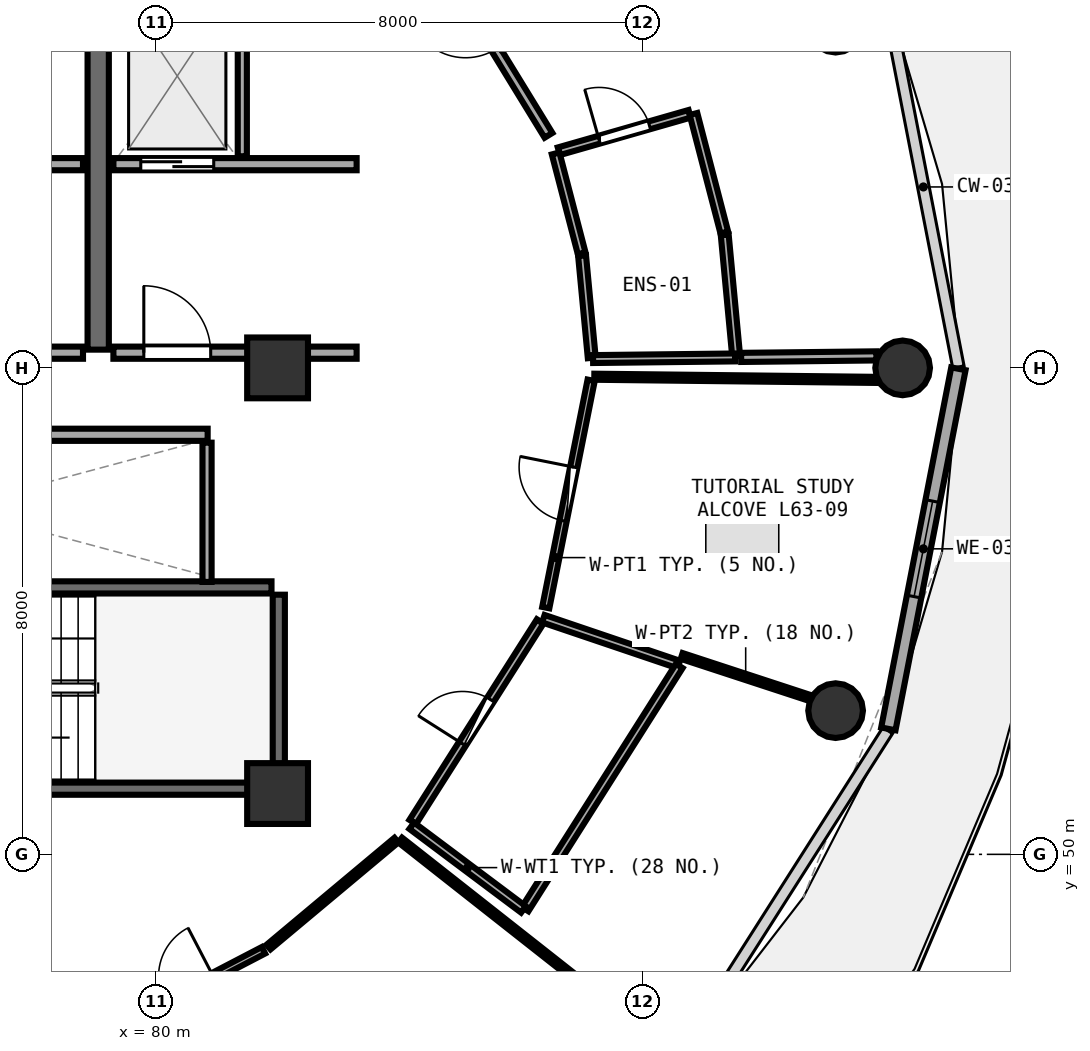
"""IFC4 building model, lengths in metres.
Left out: names, types, materials, properties, quantities, classifications, styles, units other than length and angle.
Written with IfcOpenShell. Run it as: python <this file> out.ifc"""

import sys

from ifc_helpers import new_model, si_unit, direction, frame, frame_2d, origin, origin_2d, place, context, subcontext, project, spatial, rectangle, circle, extrude, element, fill, save


model = new_model("IFC4")
c1 = context("Model", 3, precision=1e-05, world=origin(), true_north=direction((0.0, 1.0)))
c2 = subcontext(c1, "Body", "Model", "MODEL_VIEW")
j1 = project(units=[si_unit("LENGTHUNIT", "METRE"), si_unit("PLANEANGLEUNIT", "RADIAN")], contexts=[c1])
p1 = place(None, origin())
s1 = spatial("IfcSite", under=j1, at=p1, CompositionType="ELEMENT")
p2 = place(p1, origin())
s2 = spatial("IfcBuilding", under=s1, at=p2, CompositionType="ELEMENT")
p3 = place(p2, frame((0.0, 0.0, 248.7)))
s3 = spatial("IfcBuildingStorey", under=s2, at=p3, CompositionType="ELEMENT", Elevation=248.7)
for number, where, z_axis, x_axis in (
    (1, (82.0, 51.0, 0.0), (0.0, 0.0, 1.0), (1.0, 0.0, 0.0)),
    (2, (82.0, 58.0, 0.0), (0.0, 0.0, 1.0), (1.0, 0.0, 0.0)),
):
    element("IfcColumn", number, at=place(p3, frame(where, z_axis=z_axis, x_axis=x_axis)), inside=s3, PredefinedType="PILASTER", context=c2, shape_type="SweptSolid", body=[
        extrude(rectangle(XDim=1.0, YDim=1.0, at=origin_2d()), origin(), (0.0, 0.0, 1.0), 3.75),
    ])
for number, where, z_axis, x_axis in (
    (3, (92.28, 58.0, 0.0), (0.0, 0.0, 1.0), (1.0, 0.0, 0.0)),
    (4, (91.177, 63.636, 0.0), (0.0, 0.0, 1.0), (1.0, 0.0, 0.0)),
    (5, (91.177, 52.364, 0.0), (0.0, 0.0, 1.0), (1.0, 0.0, 0.0)),
):
    element("IfcColumn", number, at=place(p3, frame(where, z_axis=z_axis, x_axis=x_axis)), inside=s3, PredefinedType="COLUMN", context=c2, shape_type="SweptSolid", body=[
        extrude(circle(Radius=0.45, at=origin_2d()), origin(), (0.0, 0.0, 1.0), 3.75),
    ])
p4 = place(p3, frame((92.045, 52.063, 0.0), z_axis=(0.0, 0.0, 1.0), x_axis=(0.190969309115, 0.981596008028, 0.0)))
e6 = element("IfcWall", 6, at=p4, inside=s3, PredefinedType="SOLIDWALL", context=c2, shape_type="SweptSolid", body=[
    extrude(rectangle(XDim=6.033, YDim=0.24, at=frame_2d((3.017, 0.0))), origin(), (0.0, 0.0, 1.0), 3.475),
])
p5 = place(p4, frame((2.216, 0.0, 0.85)))
e7 = element("IfcOpeningElement", 7, at=p5, cuts=e6, PredefinedType="OPENING", context=c2, shape_type="SweptSolid", body=[
    extrude(rectangle(XDim=1.6, YDim=1.45, at=frame_2d((0.8, 0.725))), frame((0.0, 0.13, 0.0), z_axis=(0.0, -1.0, 0.0), x_axis=(1.0, 0.0, 0.0)), (0.0, 0.0, 1.0), 0.26),
])
p6 = place(p3, frame((74.0, 51.08, 0.0), z_axis=(0.0, 0.0, 1.0), x_axis=(1.0, 0.0, 0.0)))
e8 = element("IfcWall", 8, at=p6, inside=s3, PredefinedType="SHEAR", context=c2, shape_type="SweptSolid", body=[
    extrude(rectangle(XDim=7.9, YDim=0.2, at=frame_2d((3.95, 0.0))), origin(), (0.0, 0.0, 1.0), 3.49),
])
p7 = place(p6, frame((1.12, 0.0, 0.0)))
e9 = element("IfcOpeningElement", 9, at=p7, cuts=e8, PredefinedType="OPENING", context=c2, shape_type="SweptSolid", body=[
    extrude(rectangle(XDim=1.05, YDim=2.1, at=frame_2d((0.525, 1.05))), frame((0.0, 0.11, 0.0), z_axis=(0.0, -1.0, 0.0), x_axis=(1.0, 0.0, 0.0)), (0.0, 0.0, 1.0), 0.22),
])
p8 = place(p3, frame((82.02, 51.2, 0.0), z_axis=(0.0, 0.0, 1.0), x_axis=(0.0, 1.0, 0.0)))
e10 = element("IfcWall", 10, at=p8, inside=s3, PredefinedType="SHEAR", context=c2, shape_type="SweptSolid", body=[
    extrude(rectangle(XDim=3.07, YDim=0.2, at=frame_2d((1.535, 0.0))), origin(), (0.0, 0.0, 1.0), 3.49),
])
p9 = place(p3, frame((81.9, 54.39, 0.0), z_axis=(0.0, 0.0, 1.0), x_axis=(-1.0, 0.0, 0.0)))
e11 = element("IfcWall", 11, at=p9, inside=s3, PredefinedType="SHEAR", context=c2, shape_type="SweptSolid", body=[
    extrude(rectangle(XDim=8.46, YDim=0.2, at=frame_2d((4.23, 0.0))), origin(), (0.0, 0.0, 1.0), 3.49),
])
p10 = place(p3, frame((79.05, 58.3, 0.0), z_axis=(0.0, 0.0, 1.0), x_axis=(0.0, 1.0, 0.0)))
e12 = element("IfcWall", 12, at=p10, inside=s3, PredefinedType="SHEAR", context=c2, shape_type="SweptSolid", body=[
    extrude(rectangle(XDim=6.3, YDim=0.35, at=frame_2d((3.15, 0.0))), origin(), (0.0, 0.0, 1.0), 3.49),
])
p11 = place(p3, frame((74.2, 61.35, 0.0), z_axis=(0.0, 0.0, 1.0), x_axis=(1.0, 0.0, 0.0)))
e13 = element("IfcWall", 13, at=p11, inside=s3, PredefinedType="SOLIDWALL", context=c2, shape_type="SweptSolid", body=[
    extrude(rectangle(XDim=4.6, YDim=0.2, at=frame_2d((2.3, 0.0))), origin(), (0.0, 0.0, 1.0), 3.48),
])
p12 = place(p11, frame((0.52, 0.0, 0.0)))
e14 = element("IfcOpeningElement", 14, at=p12, cuts=e13, PredefinedType="OPENING", context=c2, shape_type="SweptSolid", body=[
    extrude(rectangle(XDim=1.2, YDim=2.15, at=frame_2d((0.6, 1.075))), frame((0.0, 0.11, 0.0), z_axis=(0.0, -1.0, 0.0), x_axis=(1.0, 0.0, 0.0)), (0.0, 0.0, 1.0), 0.22),
])
p13 = place(p3, frame((79.3, 61.35, 0.0), z_axis=(0.0, 0.0, 1.0), x_axis=(1.0, 0.0, 0.0)))
e15 = element("IfcWall", 15, at=p13, inside=s3, PredefinedType="SOLIDWALL", context=c2, shape_type="SweptSolid", body=[
    extrude(rectangle(XDim=4.0, YDim=0.2, at=frame_2d((2.0, 0.0))), origin(), (0.0, 0.0, 1.0), 2.775),
])
p14 = place(p13, frame((0.45, 0.0, 0.0)))
e16 = element("IfcOpeningElement", 16, at=p14, cuts=e15, PredefinedType="OPENING", context=c2, shape_type="SweptSolid", body=[
    extrude(rectangle(XDim=1.2, YDim=2.15, at=frame_2d((0.6, 1.075))), frame((0.0, 0.11, 0.0), z_axis=(0.0, -1.0, 0.0), x_axis=(1.0, 0.0, 0.0)), (0.0, 0.0, 1.0), 0.22),
])
p15 = place(p3, frame((81.42, 61.48, 0.0), z_axis=(0.0, 0.0, 1.0), x_axis=(0.0, 1.0, 0.0)))
e17 = element("IfcWall", 17, at=p15, inside=s3, PredefinedType="PARTITIONING", context=c2, shape_type="SweptSolid", body=[
    extrude(rectangle(XDim=2.84, YDim=0.15, at=frame_2d((1.42, 0.0))), origin(), (0.0, 0.0, 1.0), 3.48),
])
p16 = place(p3, frame((74.2, 58.25, 0.0), z_axis=(0.0, 0.0, 1.0), x_axis=(1.0, 0.0, 0.0)))
e18 = element("IfcWall", 18, at=p16, inside=s3, PredefinedType="SOLIDWALL", context=c2, shape_type="SweptSolid", body=[
    extrude(rectangle(XDim=4.6, YDim=0.2, at=frame_2d((2.3, 0.0))), origin(), (0.0, 0.0, 1.0), 3.48),
])
p17 = place(p16, frame((1.8, 0.0, 0.0)))
e19 = element("IfcOpeningElement", 19, at=p17, cuts=e18, PredefinedType="OPENING", context=c2, shape_type="SweptSolid", body=[
    extrude(rectangle(XDim=1.1, YDim=2.1, at=frame_2d((0.55, 1.05))), frame((0.0, 0.11, 0.0), z_axis=(0.0, -1.0, 0.0), x_axis=(1.0, 0.0, 0.0)), (0.0, 0.0, 1.0), 0.22),
])
p18 = place(p3, frame((79.3, 58.25, 0.0), z_axis=(0.0, 0.0, 1.0), x_axis=(1.0, 0.0, 0.0)))
e20 = element("IfcWall", 20, at=p18, inside=s3, PredefinedType="SOLIDWALL", context=c2, shape_type="SweptSolid", body=[
    extrude(rectangle(XDim=4.0, YDim=0.2, at=frame_2d((2.0, 0.0))), origin(), (0.0, 0.0, 1.0), 2.775),
])
p19 = place(p18, frame((0.5, 0.0, 0.0)))
e21 = element("IfcOpeningElement", 21, at=p19, cuts=e20, PredefinedType="OPENING", context=c2, shape_type="SweptSolid", body=[
    extrude(rectangle(XDim=1.1, YDim=2.1, at=frame_2d((0.55, 1.05))), frame((0.0, 0.11, 0.0), z_axis=(0.0, -1.0, 0.0), x_axis=(1.0, 0.0, 0.0)), (0.0, 0.0, 1.0), 0.22),
])
p20 = place(p3, frame((72.45, 56.9, 0.0), z_axis=(0.0, 0.0, 1.0), x_axis=(1.0, 0.0, 0.0)))
e22 = element("IfcWall", 22, at=p20, inside=s3, PredefinedType="SOLIDWALL", context=c2, shape_type="SweptSolid", body=[
    extrude(rectangle(XDim=8.4, YDim=0.2, at=frame_2d((4.2, 0.0))), origin(), (0.0, 0.0, 1.0), 3.48),
])
p21 = place(p20, frame((0.4, 0.0, 0.0)))
e23 = element("IfcOpeningElement", 23, at=p21, cuts=e22, PredefinedType="OPENING", context=c2, shape_type="SweptSolid", body=[
    extrude(rectangle(XDim=1.1, YDim=2.1, at=frame_2d((0.55, 1.05))), frame((0.0, 0.11, 0.0), z_axis=(0.0, -1.0, 0.0), x_axis=(1.0, 0.0, 0.0)), (0.0, 0.0, 1.0), 0.22),
])
p22 = place(p20, frame((2.4, 0.0, 0.0)))
e24 = element("IfcOpeningElement", 24, at=p22, cuts=e22, PredefinedType="OPENING", context=c2, shape_type="SweptSolid", body=[
    extrude(rectangle(XDim=1.1, YDim=2.1, at=frame_2d((0.55, 1.05))), frame((0.0, 0.11, 0.0), z_axis=(0.0, -1.0, 0.0), x_axis=(1.0, 0.0, 0.0)), (0.0, 0.0, 1.0), 0.22),
])
p23 = place(p3, frame((80.84, 54.48, 0.0), z_axis=(0.0, 0.0, 1.0), x_axis=(0.0, 1.0, 0.0)))
e25 = element("IfcWall", 25, at=p23, inside=s3, PredefinedType="PARTITIONING", context=c2, shape_type="SweptSolid", body=[
    extrude(rectangle(XDim=2.29, YDim=0.15, at=frame_2d((1.145, 0.0))), origin(), (0.0, 0.0, 1.0), 3.48),
])
p24 = place(p3, frame((86.626, 61.562, 0.0), z_axis=(0.0, 0.0, 1.0), x_axis=(0.961379738838, 0.275225358117, 0.0)))
e26 = element("IfcWall", 26, at=p24, inside=s3, PredefinedType="PLUMBINGWALL", context=c2, shape_type="SweptSolid", body=[
    extrude(rectangle(XDim=2.238, YDim=0.13, at=frame_2d((1.119, 0.0))), origin(), (0.0, 0.0, 1.0), 3.175),
])
p25 = place(p24, frame((0.689, 0.0, 0.0)))
e27 = element("IfcOpeningElement", 27, at=p25, cuts=e26, PredefinedType="OPENING", context=c2, shape_type="SweptSolid", body=[
    extrude(rectangle(XDim=0.86, YDim=2.05, at=frame_2d((0.43, 1.025))), frame((0.0, 0.075, 0.0), z_axis=(0.0, -1.0, 0.0), x_axis=(1.0, 0.0, 0.0)), (0.0, 0.0, 1.0), 0.15),
])
p26 = place(p3, frame((86.456, 61.824, 0.0), z_axis=(0.0, 0.0, 1.0), x_axis=(-0.522665227064, 0.852538011128, 0.0)))
e28 = element("IfcWall", 28, at=p26, inside=s3, PredefinedType="PARTITIONING", context=c2, shape_type="SweptSolid", body=[
    extrude(rectangle(XDim=4.273, YDim=0.15, at=frame_2d((2.136, 0.0))), origin(), (0.0, 0.0, 1.0), 3.075),
])
p27 = place(p26, frame((1.661, 0.0, 0.0)))
e29 = element("IfcOpeningElement", 29, at=p27, cuts=e28, PredefinedType="OPENING", context=c2, shape_type="SweptSolid", body=[
    extrude(rectangle(XDim=0.95, YDim=2.08, at=frame_2d((0.475, 1.04))), frame((0.0, 0.085, 0.0), z_axis=(0.0, -1.0, 0.0), x_axis=(1.0, 0.0, 0.0)), (0.0, 0.0, 1.0), 0.17),
])
p28 = place(p3, frame((79.319, 47.148, 0.0), z_axis=(0.0, 0.0, 1.0), x_axis=(0.887021247279, 0.461728607382, 0.0)))
e30 = element("IfcWall", 30, at=p28, inside=s3, PredefinedType="PARTITIONING", context=c2, shape_type="SweptSolid", body=[
    extrude(rectangle(XDim=2.761, YDim=0.12, at=frame_2d((1.38, 0.0))), origin(), (0.0, 0.0, 1.0), 3.235),
])
p29 = place(p28, frame((0.93, 0.0, 0.0)))
e31 = element("IfcOpeningElement", 31, at=p29, cuts=e30, PredefinedType="OPENING", context=c2, shape_type="SweptSolid", body=[
    extrude(rectangle(XDim=0.9, YDim=2.08, at=frame_2d((0.45, 1.04))), frame((0.0, 0.07, 0.0), z_axis=(0.0, -1.0, 0.0), x_axis=(1.0, 0.0, 0.0)), (0.0, 0.0, 1.0), 0.14),
])
p30 = place(p3, frame((84.223, 50.533, 0.0), z_axis=(0.0, 0.0, 1.0), x_axis=(0.536434868975, 0.84394172272, 0.0)))
e32 = element("IfcWall", 32, at=p30, inside=s3, PredefinedType="PLUMBINGWALL", context=c2, shape_type="SweptSolid", body=[
    extrude(rectangle(XDim=3.908, YDim=0.13, at=frame_2d((1.954, 0.0))), origin(), (0.0, 0.0, 1.0), 3.075),
])
p31 = place(p30, frame((1.524, 0.0, 0.0)))
e33 = element("IfcOpeningElement", 33, at=p31, cuts=e32, PredefinedType="OPENING", context=c2, shape_type="SweptSolid", body=[
    extrude(rectangle(XDim=0.86, YDim=2.05, at=frame_2d((0.43, 1.025))), frame((0.0, 0.075, 0.0), z_axis=(0.0, -1.0, 0.0), x_axis=(1.0, 0.0, 0.0)), (0.0, 0.0, 1.0), 0.15),
])
p32 = place(p3, frame((86.411, 54.058, 0.0), z_axis=(0.0, 0.0, 1.0), x_axis=(0.195845174173, 0.980634828952, 0.0)))
e34 = element("IfcWall", 34, at=p32, inside=s3, PredefinedType="PARTITIONING", context=c2, shape_type="SweptSolid", body=[
    extrude(rectangle(XDim=3.812, YDim=0.12, at=frame_2d((1.906, 0.0))), origin(), (0.0, 0.0, 1.0), 3.48),
])
p33 = place(p32, frame((1.456, 0.0, 0.0)))
e35 = element("IfcOpeningElement", 35, at=p33, cuts=e34, PredefinedType="OPENING", context=c2, shape_type="SweptSolid", body=[
    extrude(rectangle(XDim=0.9, YDim=2.08, at=frame_2d((0.45, 1.04))), frame((0.0, 0.07, 0.0), z_axis=(0.0, -1.0, 0.0), x_axis=(1.0, 0.0, 0.0)), (0.0, 0.0, 1.0), 0.14),
])
p34 = place(p3, frame((87.167, 58.165, 0.0), z_axis=(0.0, 0.0, 1.0), x_axis=(-0.094303984979, 0.995543448784, 0.0)))
e36 = element("IfcWall", 36, at=p34, inside=s3, PredefinedType="PLUMBINGWALL", context=c2, shape_type="SweptSolid", body=[
    extrude(rectangle(XDim=1.688, YDim=0.13, at=frame_2d((0.844, 0.0))), origin(), (0.0, 0.0, 1.0), 3.075),
])
p35 = place(p3, frame((87.001, 59.885, 0.0), z_axis=(0.0, 0.0, 1.0), x_axis=(-0.252205193656, 0.967673777826, 0.0)))
e37 = element("IfcWall", 37, at=p35, inside=s3, PredefinedType="PLUMBINGWALL", context=c2, shape_type="SweptSolid", body=[
    extrude(rectangle(XDim=1.697, YDim=0.13, at=frame_2d((0.849, 0.0))), origin(), (0.0, 0.0, 1.0), 3.48),
])
p36 = place(p3, frame((88.84, 62.176, 0.0), z_axis=(0.0, 0.0, 1.0), x_axis=(0.251652018774, -0.967817783184, 0.0)))
e38 = element("IfcWall", 38, at=p36, inside=s3, PredefinedType="PLUMBINGWALL", context=c2, shape_type="SweptSolid", body=[
    extrude(rectangle(XDim=2.014, YDim=0.13, at=frame_2d((1.007, 0.0))), origin(), (0.0, 0.0, 1.0), 3.48),
])
p37 = place(p3, frame((89.354, 60.187, 0.0), z_axis=(0.0, 0.0, 1.0), x_axis=(0.09380867442, -0.995590243325, 0.0)))
e39 = element("IfcWall", 39, at=p37, inside=s3, PredefinedType="PLUMBINGWALL", context=c2, shape_type="SweptSolid", body=[
    extrude(rectangle(XDim=2.004, YDim=0.13, at=frame_2d((1.002, 0.0))), origin(), (0.0, 0.0, 1.0), 3.48),
])
p38 = place(p3, frame((89.524, 58.172, 0.0), z_axis=(0.0, 0.0, 1.0), x_axis=(-0.999935061604, -0.011396164964, 0.0)))
e40 = element("IfcWall", 40, at=p38, inside=s3, PredefinedType="PLUMBINGWALL", context=c2, shape_type="SweptSolid", body=[
    extrude(rectangle(XDim=2.335, YDim=0.13, at=frame_2d((1.167, 0.0))), origin(), (0.0, 0.0, 1.0), 3.075),
])
p39 = place(p3, frame((91.848, 58.198, 0.0), z_axis=(0.0, 0.0, 1.0), x_axis=(-0.999936076373, -0.011306775263, 0.0)))
e41 = element("IfcWall", 41, at=p39, inside=s3, PredefinedType="PARTITIONING", context=c2, shape_type="SweptSolid", body=[
    extrude(rectangle(XDim=2.224, YDim=0.15, at=frame_2d((1.112, 0.0))), origin(), (0.0, 0.0, 1.0), 3.075),
])
p40 = place(p3, frame((81.852, 48.476, 0.0), z_axis=(0.0, 0.0, 1.0), x_axis=(0.767022676895, 0.641619991216, 0.0)))
e42 = element("IfcWall", 42, at=p40, inside=s3, PredefinedType="PARTITIONING", context=c2, shape_type="SweptSolid", body=[
    extrude(rectangle(XDim=2.741, YDim=0.1, at=frame_2d((1.371, 0.0))), origin(), (0.0, 0.0, 1.0), 3.075),
])
p41 = place(p3, frame((84.016, 50.235, 0.0), z_axis=(0.0, 0.0, 1.0), x_axis=(0.785736749878, -0.618561039745, 0.0)))
e43 = element("IfcWall", 43, at=p41, inside=s3, PredefinedType="PARTITIONING", context=c2, shape_type="SweptSolid", body=[
    extrude(rectangle(XDim=4.475, YDim=0.1, at=frame_2d((2.237, 0.0))), origin(), (0.0, 0.0, 1.0), 3.075),
])
p42 = place(p3, frame((86.371, 53.875, 0.0), z_axis=(0.0, 0.0, 1.0), x_axis=(0.947177643747, -0.320709387431, 0.0)))
e44 = element("IfcWall", 44, at=p42, inside=s3, PredefinedType="PLUMBINGWALL", context=c2, shape_type="SweptSolid", body=[
    extrude(rectangle(XDim=2.352, YDim=0.13, at=frame_2d((1.176, 0.0))), origin(), (0.0, 0.0, 1.0), 3.175),
])
p43 = place(p3, frame((88.606, 53.098, 0.0), z_axis=(0.0, 0.0, 1.0), x_axis=(-0.535433501212, -0.844577388864, 0.0)))
e45 = element("IfcWall", 45, at=p43, inside=s3, PredefinedType="PLUMBINGWALL", context=c2, shape_type="SweptSolid", body=[
    extrude(rectangle(XDim=4.735, YDim=0.13, at=frame_2d((2.368, 0.0))), origin(), (0.0, 0.0, 1.0), 3.075),
])
p44 = place(p3, frame((86.044, 49.094, 0.0), z_axis=(0.0, 0.0, 1.0), x_axis=(-0.800357274386, 0.599523338442, 0.0)))
e46 = element("IfcWall", 46, at=p44, inside=s3, PredefinedType="PLUMBINGWALL", context=c2, shape_type="SweptSolid", body=[
    extrude(rectangle(XDim=2.295, YDim=0.13, at=frame_2d((1.147, 0.0))), origin(), (0.0, 0.0, 1.0), 3.175),
])
p45 = place(p3, frame((87.209, 57.854, 0.0), z_axis=(0.0, 0.0, 1.0), x_axis=(0.999937174585, -0.01120923205, 0.0)))
e47 = element("IfcWall", 47, at=p45, inside=s3, PredefinedType="PARTITIONING", context=c2, shape_type="SweptSolid", body=[
    extrude(rectangle(XDim=4.639, YDim=0.1, at=frame_2d((2.32, 0.0))), origin(), (0.0, 0.0, 1.0), 3.075),
])
p46 = place(p3, frame((90.751, 52.573, 0.0), z_axis=(0.0, 0.0, 1.0), x_axis=(-0.950301719956, 0.311330437073, 0.0)))
e48 = element("IfcWall", 48, at=p46, inside=s3, PredefinedType="PARTITIONING", context=c2, shape_type="SweptSolid", body=[
    extrude(rectangle(XDim=2.215, YDim=0.1, at=frame_2d((1.108, 0.0))), origin(), (0.0, 0.0, 1.0), 3.235),
])
p47 = place(p5, origin())
e49 = element("IfcWindow", 49, at=p47, inside=s3, PartitioningType="SINGLE_PANEL", PredefinedType="WINDOW", context=c2, shape_type="SweptSolid", body=[
    extrude(rectangle(XDim=1.6, YDim=1.45, at=frame_2d((0.8, 0.725))), frame((0.0, 0.03, 0.0), z_axis=(0.0, -1.0, 0.0), x_axis=(1.0, 0.0, 0.0)), (0.0, 0.0, 1.0), 0.06),
])
fill(e7, e49)
p48 = place(p14, origin())
e50 = element("IfcDoor", 50, at=p48, inside=s3, OperationType="DOUBLE_DOOR_SLIDING", PredefinedType="DOOR", context=c2, shape_type="SweptSolid", body=[
    extrude(rectangle(XDim=1.2, YDim=2.15, at=frame_2d((0.6, 1.075))), frame((0.0, 0.025, 0.0), z_axis=(0.0, -1.0, 0.0), x_axis=(1.0, 0.0, 0.0)), (0.0, 0.0, 1.0), 0.05),
])
fill(e16, e50)
p49 = place(p19, frame((1.1, 0.0, 0.0), z_axis=(0.0, 0.0, 1.0), x_axis=(-1.0, 0.0, 0.0)))
e51 = element("IfcDoor", 51, at=p49, inside=s3, OperationType="SINGLE_SWING_RIGHT", PredefinedType="DOOR", context=c2, shape_type="SweptSolid", body=[
    extrude(rectangle(XDim=1.1, YDim=2.1, at=frame_2d((0.55, 1.05))), frame((0.0, 0.025, 0.0), z_axis=(0.0, -1.0, 0.0), x_axis=(1.0, 0.0, 0.0)), (0.0, 0.0, 1.0), 0.05),
])
fill(e21, e51)
p50 = place(p25, origin())
e52 = element("IfcDoor", 52, at=p50, inside=s3, OperationType="SINGLE_SWING_LEFT", PredefinedType="DOOR", context=c2, shape_type="SweptSolid", body=[
    extrude(rectangle(XDim=0.86, YDim=2.05, at=frame_2d((0.43, 1.025))), frame((0.0, 0.025, 0.0), z_axis=(0.0, -1.0, 0.0), x_axis=(1.0, 0.0, 0.0)), (0.0, 0.0, 1.0), 0.05),
])
fill(e27, e52)
p51 = place(p31, origin())
e53 = element("IfcDoor", 53, at=p51, inside=s3, OperationType="SINGLE_SWING_LEFT", PredefinedType="DOOR", context=c2, shape_type="SweptSolid", body=[
    extrude(rectangle(XDim=0.86, YDim=2.05, at=frame_2d((0.43, 1.025))), frame((0.0, 0.025, 0.0), z_axis=(0.0, -1.0, 0.0), x_axis=(1.0, 0.0, 0.0)), (0.0, 0.0, 1.0), 0.05),
])
fill(e33, e53)
p52 = place(p33, origin())
e54 = element("IfcDoor", 54, at=p52, inside=s3, OperationType="SINGLE_SWING_RIGHT", PredefinedType="DOOR", context=c2, shape_type="SweptSolid", body=[
    extrude(rectangle(XDim=0.9, YDim=2.08, at=frame_2d((0.45, 1.04))), frame((0.0, 0.025, 0.0), z_axis=(0.0, -1.0, 0.0), x_axis=(1.0, 0.0, 0.0)), (0.0, 0.0, 1.0), 0.05),
])
fill(e35, e54)
save(model, sys.argv[1])
